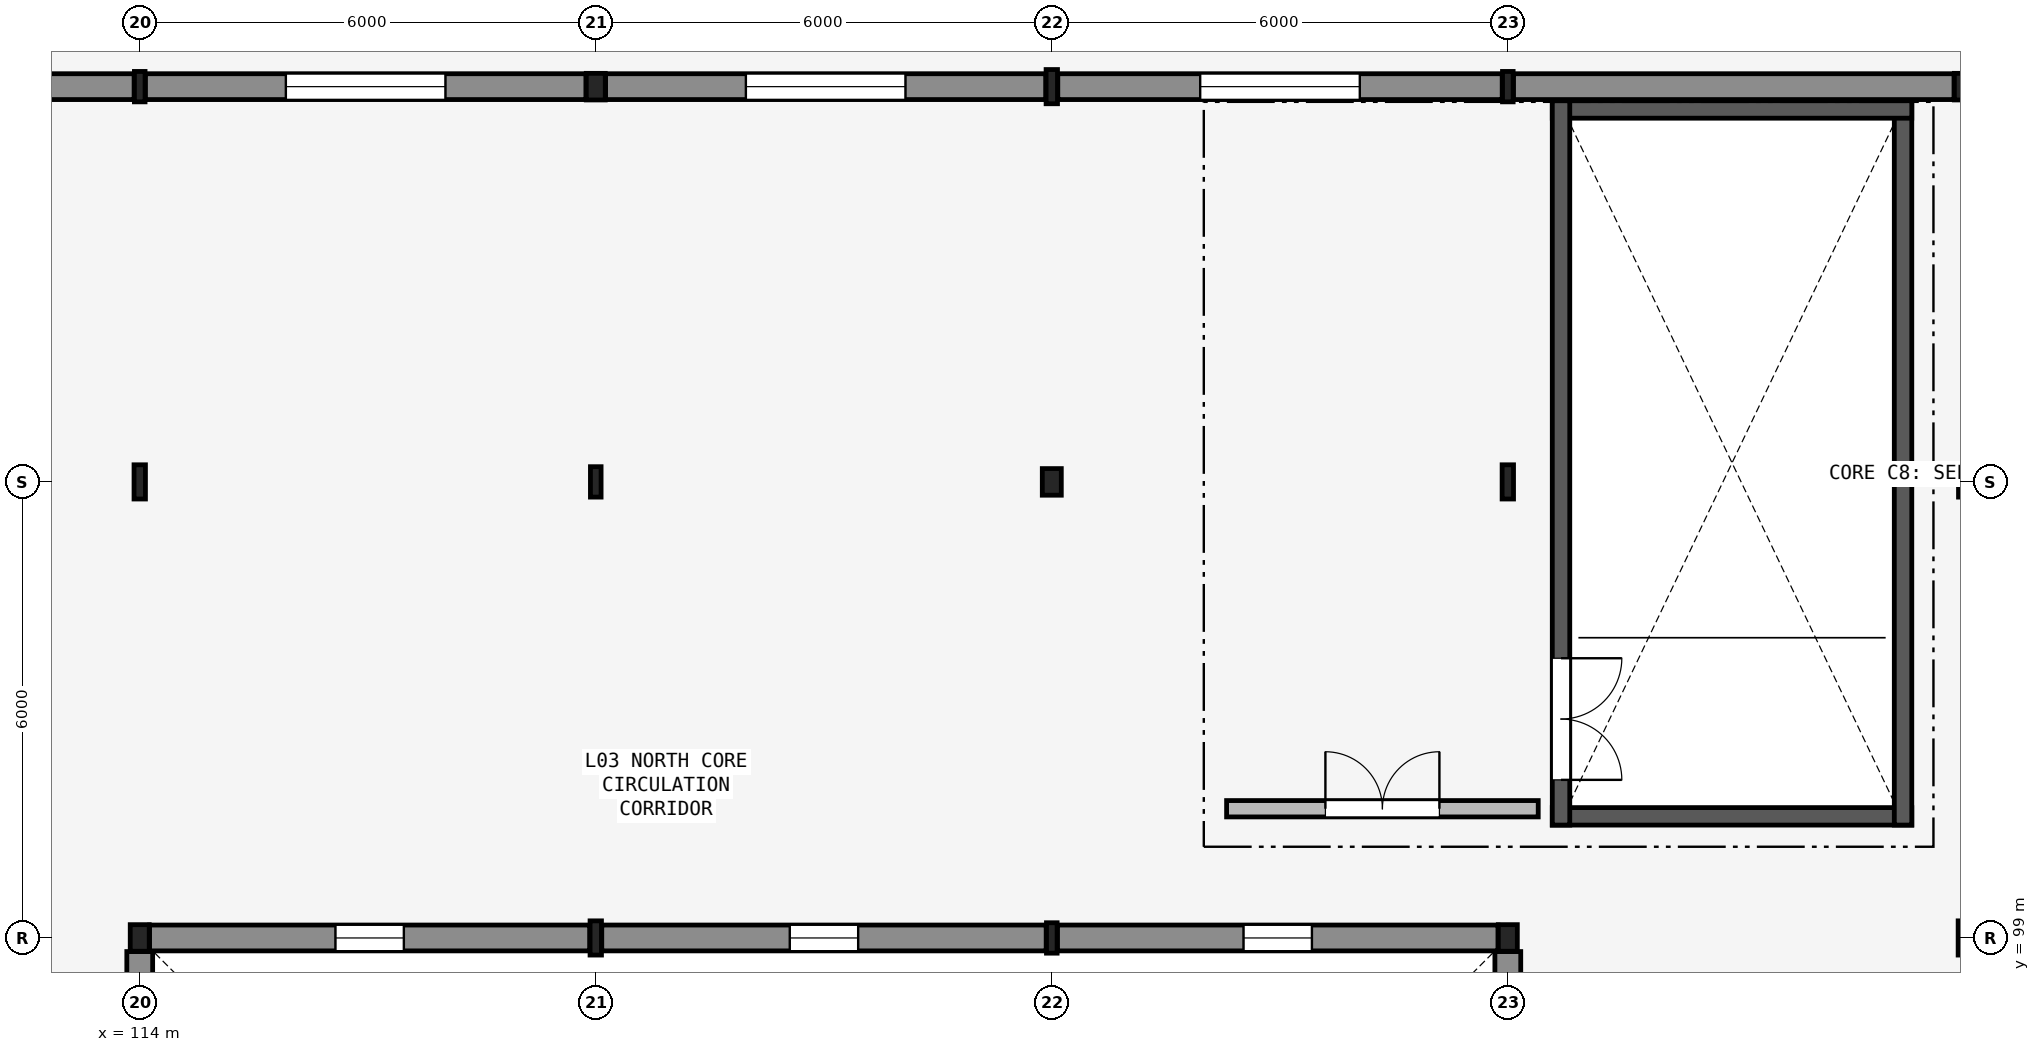
"""IFC4 building model, lengths in metres.
Left out: names, types, materials, properties, quantities, classifications, styles, units other than length and angle.
Written with IfcOpenShell. Run it as: python <this file> out.ifc"""

import sys

from ifc_helpers import new_model, si_unit, direction, frame, frame_2d, origin, origin_2d, place, context, subcontext, project, spatial, rectangle, i_section, extrude, element, fill, save


model = new_model("IFC4")
c1 = context("Model", 3, precision=1e-05, world=origin(), true_north=direction((0.0, 1.0)))
c2 = subcontext(c1, "Body", "Model", "MODEL_VIEW")
j1 = project(units=[si_unit("LENGTHUNIT", "METRE"), si_unit("PLANEANGLEUNIT", "RADIAN")], contexts=[c1])
p1 = place(None, origin())
s1 = spatial("IfcSite", under=j1, at=p1, CompositionType="ELEMENT")
p2 = place(p1, origin())
s2 = spatial("IfcBuilding", under=s1, at=p2, CompositionType="ELEMENT")
p3 = place(p2, frame((0.0, 0.0, 13.5)))
s3 = spatial("IfcBuildingStorey", under=s2, at=p3, CompositionType="ELEMENT", Elevation=13.5)
p4 = place(p3, frame((114.0, 99.0, 0.0), z_axis=(0.0, 0.0, 1.0), x_axis=(1.0, 0.0, 0.0)))
e1 = element("IfcColumn", 1, at=p4, inside=s3, PredefinedType="COLUMN", context=c2, shape_type="SweptSolid", body=[
    extrude(i_section(OverallWidth=0.25, OverallDepth=0.35, WebThickness=0.01, FlangeThickness=0.012, FilletRadius=0.012, at=origin_2d()), origin(), (0.0, 0.0, 1.0), 4.5),
])
p5 = place(p3, frame((114.0, 105.0, 0.0), z_axis=(0.0, 0.0, 1.0), x_axis=(1.0, 0.0, 0.0)))
e2 = element("IfcColumn", 2, at=p5, inside=s3, PredefinedType="COLUMN", context=c2, shape_type="SweptSolid", body=[
    extrude(i_section(OverallWidth=0.15, OverallDepth=0.45, WebThickness=0.01, FlangeThickness=0.017, FilletRadius=0.015, at=origin_2d()), origin(), (0.0, 0.0, 1.0), 4.5),
])
p6 = place(p3, frame((114.0, 110.2, 0.0), z_axis=(0.0, 0.0, 1.0), x_axis=(1.0, 0.0, 0.0)))
e3 = element("IfcColumn", 3, at=p6, inside=s3, PredefinedType="COLUMN", context=c2, shape_type="SweptSolid", body=[
    extrude(i_section(OverallWidth=0.14, OverallDepth=0.4, WebThickness=0.009, FlangeThickness=0.016, FilletRadius=0.014, at=origin_2d()), origin(), (0.0, 0.0, 1.0), 4.5),
])
p7 = place(p3, frame((120.0, 99.0, 0.0), z_axis=(0.0, 0.0, 1.0), x_axis=(1.0, 0.0, 0.0)))
e4 = element("IfcColumn", 4, at=p7, inside=s3, PredefinedType="COLUMN", context=c2, shape_type="SweptSolid", body=[
    extrude(i_section(OverallWidth=0.15, OverallDepth=0.45, WebThickness=0.01, FlangeThickness=0.017, FilletRadius=0.015, at=origin_2d()), origin(), (0.0, 0.0, 1.0), 4.5),
])
p8 = place(p3, frame((120.0, 105.0, 0.0), z_axis=(0.0, 0.0, 1.0), x_axis=(1.0, 0.0, 0.0)))
e5 = element("IfcColumn", 5, at=p8, inside=s3, PredefinedType="COLUMN", context=c2, shape_type="SweptSolid", body=[
    extrude(i_section(OverallWidth=0.14, OverallDepth=0.4, WebThickness=0.009, FlangeThickness=0.016, FilletRadius=0.014, at=origin_2d()), origin(), (0.0, 0.0, 1.0), 4.5),
])
p9 = place(p3, frame((120.0, 110.2, 0.0), z_axis=(0.0, 0.0, 1.0), x_axis=(1.0, 0.0, 0.0)))
e6 = element("IfcColumn", 6, at=p9, inside=s3, PredefinedType="COLUMN", context=c2, shape_type="SweptSolid", body=[
    extrude(i_section(OverallWidth=0.25, OverallDepth=0.35, WebThickness=0.01, FlangeThickness=0.012, FilletRadius=0.012, at=origin_2d()), origin(), (0.0, 0.0, 1.0), 4.5),
])
p10 = place(p3, frame((126.0, 99.0, 0.0), z_axis=(0.0, 0.0, 1.0), x_axis=(1.0, 0.0, 0.0)))
e7 = element("IfcColumn", 7, at=p10, inside=s3, PredefinedType="COLUMN", context=c2, shape_type="SweptSolid", body=[
    extrude(i_section(OverallWidth=0.14, OverallDepth=0.4, WebThickness=0.009, FlangeThickness=0.016, FilletRadius=0.014, at=origin_2d()), origin(), (0.0, 0.0, 1.0), 4.5),
])
p11 = place(p3, frame((126.0, 105.0, 0.0), z_axis=(0.0, 0.0, 1.0), x_axis=(1.0, 0.0, 0.0)))
e8 = element("IfcColumn", 8, at=p11, inside=s3, PredefinedType="COLUMN", context=c2, shape_type="SweptSolid", body=[
    extrude(i_section(OverallWidth=0.25, OverallDepth=0.35, WebThickness=0.01, FlangeThickness=0.012, FilletRadius=0.012, at=origin_2d()), origin(), (0.0, 0.0, 1.0), 4.5),
])
p12 = place(p3, frame((126.0, 110.2, 0.0), z_axis=(0.0, 0.0, 1.0), x_axis=(1.0, 0.0, 0.0)))
e9 = element("IfcColumn", 9, at=p12, inside=s3, PredefinedType="COLUMN", context=c2, shape_type="SweptSolid", body=[
    extrude(i_section(OverallWidth=0.15, OverallDepth=0.45, WebThickness=0.01, FlangeThickness=0.017, FilletRadius=0.015, at=origin_2d()), origin(), (0.0, 0.0, 1.0), 4.5),
])
p13 = place(p3, frame((132.0, 99.0, 0.0), z_axis=(0.0, 0.0, 1.0), x_axis=(1.0, 0.0, 0.0)))
e10 = element("IfcColumn", 10, at=p13, inside=s3, PredefinedType="COLUMN", context=c2, shape_type="SweptSolid", body=[
    extrude(i_section(OverallWidth=0.25, OverallDepth=0.35, WebThickness=0.01, FlangeThickness=0.012, FilletRadius=0.012, at=origin_2d()), origin(), (0.0, 0.0, 1.0), 4.5),
])
p14 = place(p3, frame((132.0, 105.0, 0.0), z_axis=(0.0, 0.0, 1.0), x_axis=(1.0, 0.0, 0.0)))
e11 = element("IfcColumn", 11, at=p14, inside=s3, PredefinedType="COLUMN", context=c2, shape_type="SweptSolid", body=[
    extrude(i_section(OverallWidth=0.15, OverallDepth=0.45, WebThickness=0.01, FlangeThickness=0.017, FilletRadius=0.015, at=origin_2d()), origin(), (0.0, 0.0, 1.0), 4.5),
])
p15 = place(p3, frame((132.0, 110.2, 0.0), z_axis=(0.0, 0.0, 1.0), x_axis=(1.0, 0.0, 0.0)))
e12 = element("IfcColumn", 12, at=p15, inside=s3, PredefinedType="COLUMN", context=c2, shape_type="SweptSolid", body=[
    extrude(i_section(OverallWidth=0.14, OverallDepth=0.4, WebThickness=0.009, FlangeThickness=0.016, FilletRadius=0.014, at=origin_2d()), origin(), (0.0, 0.0, 1.0), 4.5),
])
p16 = place(p3, frame((138.0, 99.0, 0.0), z_axis=(0.0, 0.0, 1.0), x_axis=(1.0, 0.0, 0.0)))
e13 = element("IfcColumn", 13, at=p16, inside=s3, PredefinedType="COLUMN", context=c2, shape_type="SweptSolid", body=[
    extrude(i_section(OverallWidth=0.15, OverallDepth=0.45, WebThickness=0.01, FlangeThickness=0.017, FilletRadius=0.015, at=origin_2d()), origin(), (0.0, 0.0, 1.0), 4.5),
])
p17 = place(p3, frame((138.0, 105.0, 0.0), z_axis=(0.0, 0.0, 1.0), x_axis=(1.0, 0.0, 0.0)))
e14 = element("IfcColumn", 14, at=p17, inside=s3, PredefinedType="COLUMN", context=c2, shape_type="SweptSolid", body=[
    extrude(i_section(OverallWidth=0.14, OverallDepth=0.4, WebThickness=0.009, FlangeThickness=0.016, FilletRadius=0.014, at=origin_2d()), origin(), (0.0, 0.0, 1.0), 4.5),
])
p18 = place(p3, frame((138.0, 110.2, 0.0), z_axis=(0.0, 0.0, 1.0), x_axis=(1.0, 0.0, 0.0)))
e15 = element("IfcColumn", 15, at=p18, inside=s3, PredefinedType="COLUMN", context=c2, shape_type="SweptSolid", body=[
    extrude(i_section(OverallWidth=0.25, OverallDepth=0.35, WebThickness=0.01, FlangeThickness=0.012, FilletRadius=0.012, at=origin_2d()), origin(), (0.0, 0.0, 1.0), 4.5),
])
p19 = place(p3, frame((108.079, 110.2, 0.0), z_axis=(0.0, 0.0, 1.0), x_axis=(1.0, 0.0, 0.0)))
e16 = element("IfcWall", 16, at=p19, inside=s3, PredefinedType="SOLIDWALL", context=c2, shape_type="SweptSolid", body=[
    extrude(rectangle(XDim=5.847, YDim=0.34, at=frame_2d((2.923, 0.0))), origin(), (0.0, 0.0, 1.0), 3.74),
])
p20 = place(p19, frame((1.874, 0.0, 0.9)))
e17 = element("IfcOpeningElement", 17, at=p20, cuts=e16, PredefinedType="OPENING", context=c2, shape_type="SweptSolid", body=[
    extrude(rectangle(XDim=2.1, YDim=1.5, at=frame_2d((1.05, 0.75))), frame((0.0, 0.18, 0.0), z_axis=(0.0, -1.0, 0.0), x_axis=(1.0, 0.0, 0.0)), (0.0, 0.0, 1.0), 0.36),
])
p21 = place(p3, frame((114.074, 110.2, 0.0), z_axis=(0.0, 0.0, 1.0), x_axis=(1.0, 0.0, 0.0)))
e18 = element("IfcWall", 18, at=p21, inside=s3, PredefinedType="SOLIDWALL", context=c2, shape_type="SweptSolid", body=[
    extrude(rectangle(XDim=5.797, YDim=0.34, at=frame_2d((2.898, 0.0))), origin(), (0.0, 0.0, 1.0), 3.74),
])
p22 = place(p21, frame((1.848, 0.0, 0.9)))
e19 = element("IfcOpeningElement", 19, at=p22, cuts=e18, PredefinedType="OPENING", context=c2, shape_type="SweptSolid", body=[
    extrude(rectangle(XDim=2.1, YDim=1.5, at=frame_2d((1.05, 0.75))), frame((0.0, 0.18, 0.0), z_axis=(0.0, -1.0, 0.0), x_axis=(1.0, 0.0, 0.0)), (0.0, 0.0, 1.0), 0.36),
])
p23 = place(p3, frame((120.129, 110.2, 0.0), z_axis=(0.0, 0.0, 1.0), x_axis=(1.0, 0.0, 0.0)))
e20 = element("IfcWall", 20, at=p23, inside=s3, PredefinedType="SOLIDWALL", context=c2, shape_type="SweptSolid", body=[
    extrude(rectangle(XDim=5.792, YDim=0.34, at=frame_2d((2.896, 0.0))), origin(), (0.0, 0.0, 1.0), 3.74),
])
p24 = place(p23, frame((1.846, 0.0, 0.9)))
e21 = element("IfcOpeningElement", 21, at=p24, cuts=e20, PredefinedType="OPENING", context=c2, shape_type="SweptSolid", body=[
    extrude(rectangle(XDim=2.1, YDim=1.5, at=frame_2d((1.05, 0.75))), frame((0.0, 0.18, 0.0), z_axis=(0.0, -1.0, 0.0), x_axis=(1.0, 0.0, 0.0)), (0.0, 0.0, 1.0), 0.36),
])
p25 = place(p3, frame((126.079, 110.2, 0.0), z_axis=(0.0, 0.0, 1.0), x_axis=(1.0, 0.0, 0.0)))
e22 = element("IfcWall", 22, at=p25, inside=s3, PredefinedType="SOLIDWALL", context=c2, shape_type="SweptSolid", body=[
    extrude(rectangle(XDim=5.847, YDim=0.34, at=frame_2d((2.923, 0.0))), origin(), (0.0, 0.0, 1.0), 3.74),
])
p26 = place(p25, frame((1.874, 0.0, 0.9)))
e23 = element("IfcOpeningElement", 23, at=p26, cuts=e22, PredefinedType="OPENING", context=c2, shape_type="SweptSolid", body=[
    extrude(rectangle(XDim=2.1, YDim=1.5, at=frame_2d((1.05, 0.75))), frame((0.0, 0.18, 0.0), z_axis=(0.0, -1.0, 0.0), x_axis=(1.0, 0.0, 0.0)), (0.0, 0.0, 1.0), 0.36),
])
p27 = place(p3, frame((132.074, 110.2, 0.0), z_axis=(0.0, 0.0, 1.0), x_axis=(1.0, 0.0, 0.0)))
e24 = element("IfcWall", 24, at=p27, inside=s3, PredefinedType="SOLIDWALL", context=c2, shape_type="SweptSolid", body=[
    extrude(rectangle(XDim=5.797, YDim=0.34, at=frame_2d((2.898, 0.0))), origin(), (0.0, 0.0, 1.0), 3.74),
])
p28 = place(p3, frame((114.129, 99.0, 0.0), z_axis=(0.0, 0.0, 1.0), x_axis=(1.0, 0.0, 0.0)))
e25 = element("IfcWall", 25, at=p28, inside=s3, PredefinedType="SOLIDWALL", context=c2, shape_type="SweptSolid", body=[
    extrude(rectangle(XDim=5.792, YDim=0.34, at=frame_2d((2.896, 0.0))), origin(), (0.0, 0.0, 1.0), 3.69),
])
p29 = place(p28, frame((2.446, 0.0, 1.6)))
e26 = element("IfcOpeningElement", 26, at=p29, cuts=e25, PredefinedType="OPENING", context=c2, shape_type="SweptSolid", body=[
    extrude(rectangle(XDim=0.9, YDim=0.6, at=frame_2d((0.45, 0.3))), frame((0.0, 0.18, 0.0), z_axis=(0.0, -1.0, 0.0), x_axis=(1.0, 0.0, 0.0)), (0.0, 0.0, 1.0), 0.36),
])
p30 = place(p3, frame((120.079, 99.0, 0.0), z_axis=(0.0, 0.0, 1.0), x_axis=(1.0, 0.0, 0.0)))
e27 = element("IfcWall", 27, at=p30, inside=s3, PredefinedType="SOLIDWALL", context=c2, shape_type="SweptSolid", body=[
    extrude(rectangle(XDim=5.847, YDim=0.34, at=frame_2d((2.923, 0.0))), origin(), (0.0, 0.0, 1.0), 3.69),
])
p31 = place(p30, frame((2.473, 0.0, 1.6)))
e28 = element("IfcOpeningElement", 28, at=p31, cuts=e27, PredefinedType="OPENING", context=c2, shape_type="SweptSolid", body=[
    extrude(rectangle(XDim=0.9, YDim=0.6, at=frame_2d((0.45, 0.3))), frame((0.0, 0.18, 0.0), z_axis=(0.0, -1.0, 0.0), x_axis=(1.0, 0.0, 0.0)), (0.0, 0.0, 1.0), 0.36),
])
p32 = place(p3, frame((126.074, 99.0, 0.0), z_axis=(0.0, 0.0, 1.0), x_axis=(1.0, 0.0, 0.0)))
e29 = element("IfcWall", 29, at=p32, inside=s3, PredefinedType="SOLIDWALL", context=c2, shape_type="SweptSolid", body=[
    extrude(rectangle(XDim=5.797, YDim=0.34, at=frame_2d((2.898, 0.0))), origin(), (0.0, 0.0, 1.0), 3.69),
])
p33 = place(p32, frame((2.448, 0.0, 1.6)))
e30 = element("IfcOpeningElement", 30, at=p33, cuts=e29, PredefinedType="OPENING", context=c2, shape_type="SweptSolid", body=[
    extrude(rectangle(XDim=0.9, YDim=0.6, at=frame_2d((0.45, 0.3))), frame((0.0, 0.18, 0.0), z_axis=(0.0, -1.0, 0.0), x_axis=(1.0, 0.0, 0.0)), (0.0, 0.0, 1.0), 0.36),
])
p34 = place(p3, frame((114.0, 93.204, 0.0), z_axis=(0.0, 0.0, 1.0), x_axis=(0.0, 1.0, 0.0)))
e31 = element("IfcWall", 31, at=p34, inside=s3, PredefinedType="SOLIDWALL", context=c2, shape_type="SweptSolid", body=[
    extrude(rectangle(XDim=5.617, YDim=0.34, at=frame_2d((2.809, 0.0))), origin(), (0.0, 0.0, 1.0), 3.69),
])
p35 = place(p34, frame((2.358, 0.0, 1.6)))
e32 = element("IfcOpeningElement", 32, at=p35, cuts=e31, PredefinedType="OPENING", context=c2, shape_type="SweptSolid", body=[
    extrude(rectangle(XDim=0.9, YDim=0.6, at=frame_2d((0.45, 0.3))), frame((0.0, 0.18, 0.0), z_axis=(0.0, -1.0, 0.0), x_axis=(1.0, 0.0, 0.0)), (0.0, 0.0, 1.0), 0.36),
])
p36 = place(p3, frame((132.0, 93.204, 0.0), z_axis=(0.0, 0.0, 1.0), x_axis=(0.0, 1.0, 0.0)))
e33 = element("IfcWall", 33, at=p36, inside=s3, PredefinedType="SOLIDWALL", context=c2, shape_type="SweptSolid", body=[
    extrude(rectangle(XDim=5.617, YDim=0.34, at=frame_2d((2.809, 0.0))), origin(), (0.0, 0.0, 1.0), 3.59),
])
p37 = place(p36, frame((2.358, 0.0, 1.6)))
e34 = element("IfcOpeningElement", 34, at=p37, cuts=e33, PredefinedType="OPENING", context=c2, shape_type="SweptSolid", body=[
    extrude(rectangle(XDim=0.9, YDim=0.6, at=frame_2d((0.45, 0.3))), frame((0.0, 0.18, 0.0), z_axis=(0.0, -1.0, 0.0), x_axis=(1.0, 0.0, 0.0)), (0.0, 0.0, 1.0), 0.36),
])
p38 = place(p3, frame((132.585, 100.6, 0.0), z_axis=(0.0, 0.0, 1.0), x_axis=(1.0, 0.0, 0.0)))
e35 = element("IfcWall", 35, at=p38, inside=s3, PredefinedType="SHEAR", context=c2, shape_type="SweptSolid", body=[
    extrude(rectangle(XDim=4.73, YDim=0.23, at=frame_2d((2.365, 0.0))), origin(), (0.0, 0.0, 1.0), 4.36),
])
p39 = place(p3, frame((137.2, 100.485, 0.0), z_axis=(0.0, 0.0, 1.0), x_axis=(0.0, 1.0, 0.0)))
e36 = element("IfcWall", 36, at=p39, inside=s3, PredefinedType="SHEAR", context=c2, shape_type="SweptSolid", body=[
    extrude(rectangle(XDim=9.53, YDim=0.23, at=frame_2d((4.765, 0.0))), origin(), (0.0, 0.0, 1.0), 4.36),
])
p40 = place(p3, frame((137.315, 109.9, 0.0), z_axis=(0.0, 0.0, 1.0), x_axis=(-1.0, 0.0, 0.0)))
e37 = element("IfcWall", 37, at=p40, inside=s3, PredefinedType="SHEAR", context=c2, shape_type="SweptSolid", body=[
    extrude(rectangle(XDim=4.73, YDim=0.23, at=frame_2d((2.365, 0.0))), origin(), (0.0, 0.0, 1.0), 4.36),
])
p41 = place(p3, frame((132.7, 110.015, 0.0), z_axis=(0.0, 0.0, 1.0), x_axis=(0.0, -1.0, 0.0)))
e38 = element("IfcWall", 38, at=p41, inside=s3, PredefinedType="SHEAR", context=c2, shape_type="SweptSolid", body=[
    extrude(rectangle(XDim=9.53, YDim=0.23, at=frame_2d((4.765, 0.0))), origin(), (0.0, 0.0, 1.0), 4.36),
])
p42 = place(p41, frame((7.335, 0.0, 0.0)))
e39 = element("IfcOpeningElement", 39, at=p42, cuts=e38, PredefinedType="OPENING", context=c2, shape_type="SweptSolid", body=[
    extrude(rectangle(XDim=1.6, YDim=2.2, at=frame_2d((0.8, 1.1))), frame((0.0, 0.125, 0.0), z_axis=(0.0, -1.0, 0.0), x_axis=(1.0, 0.0, 0.0)), (0.0, 0.0, 1.0), 0.25),
])
p43 = place(p3, frame((128.3, 100.7, 0.0), z_axis=(0.0, 0.0, 1.0), x_axis=(1.0, 0.0, 0.0)))
e40 = element("IfcWall", 40, at=p43, inside=s3, PredefinedType="PARTITIONING", context=c2, shape_type="SweptSolid", body=[
    extrude(rectangle(XDim=4.1, YDim=0.215, at=frame_2d((2.05, 0.0))), origin(), (0.0, 0.0, 1.0), 3.69),
])
p44 = place(p43, frame((1.3, 0.0, 0.0)))
e41 = element("IfcOpeningElement", 41, at=p44, cuts=e40, PredefinedType="OPENING", context=c2, shape_type="SweptSolid", body=[
    extrude(rectangle(XDim=1.5, YDim=2.15, at=frame_2d((0.75, 1.075))), frame((0.0, 0.117, 0.0), z_axis=(0.0, -1.0, 0.0), x_axis=(1.0, 0.0, 0.0)), (0.0, 0.0, 1.0), 0.235),
])
p45 = place(p22, origin())
e42 = element("IfcWindow", 42, at=p45, inside=s3, PartitioningType="SINGLE_PANEL", PredefinedType="WINDOW", context=c2, shape_type="SweptSolid", body=[
    extrude(rectangle(XDim=2.1, YDim=1.5, at=frame_2d((1.05, 0.75))), frame((0.0, 0.03, 0.0), z_axis=(0.0, -1.0, 0.0), x_axis=(1.0, 0.0, 0.0)), (0.0, 0.0, 1.0), 0.06),
])
fill(e19, e42)
p46 = place(p24, origin())
e43 = element("IfcWindow", 43, at=p46, inside=s3, PartitioningType="SINGLE_PANEL", PredefinedType="WINDOW", context=c2, shape_type="SweptSolid", body=[
    extrude(rectangle(XDim=2.1, YDim=1.5, at=frame_2d((1.05, 0.75))), frame((0.0, 0.03, 0.0), z_axis=(0.0, -1.0, 0.0), x_axis=(1.0, 0.0, 0.0)), (0.0, 0.0, 1.0), 0.06),
])
fill(e21, e43)
p47 = place(p26, origin())
e44 = element("IfcWindow", 44, at=p47, inside=s3, PartitioningType="SINGLE_PANEL", PredefinedType="WINDOW", context=c2, shape_type="SweptSolid", body=[
    extrude(rectangle(XDim=2.1, YDim=1.5, at=frame_2d((1.05, 0.75))), frame((0.0, 0.03, 0.0), z_axis=(0.0, -1.0, 0.0), x_axis=(1.0, 0.0, 0.0)), (0.0, 0.0, 1.0), 0.06),
])
fill(e23, e44)
p48 = place(p29, origin())
e45 = element("IfcWindow", 45, at=p48, inside=s3, PartitioningType="SINGLE_PANEL", PredefinedType="WINDOW", context=c2, shape_type="SweptSolid", body=[
    extrude(rectangle(XDim=0.9, YDim=0.6, at=frame_2d((0.45, 0.3))), frame((0.0, 0.03, 0.0), z_axis=(0.0, -1.0, 0.0), x_axis=(1.0, 0.0, 0.0)), (0.0, 0.0, 1.0), 0.06),
])
fill(e26, e45)
p49 = place(p31, origin())
e46 = element("IfcWindow", 46, at=p49, inside=s3, PartitioningType="SINGLE_PANEL", PredefinedType="WINDOW", context=c2, shape_type="SweptSolid", body=[
    extrude(rectangle(XDim=0.9, YDim=0.6, at=frame_2d((0.45, 0.3))), frame((0.0, 0.03, 0.0), z_axis=(0.0, -1.0, 0.0), x_axis=(1.0, 0.0, 0.0)), (0.0, 0.0, 1.0), 0.06),
])
fill(e28, e46)
p50 = place(p33, origin())
e47 = element("IfcWindow", 47, at=p50, inside=s3, PartitioningType="SINGLE_PANEL", PredefinedType="WINDOW", context=c2, shape_type="SweptSolid", body=[
    extrude(rectangle(XDim=0.9, YDim=0.6, at=frame_2d((0.45, 0.3))), frame((0.0, 0.03, 0.0), z_axis=(0.0, -1.0, 0.0), x_axis=(1.0, 0.0, 0.0)), (0.0, 0.0, 1.0), 0.06),
])
fill(e30, e47)
p51 = place(p42, origin())
e48 = element("IfcDoor", 48, at=p51, inside=s3, OperationType="DOUBLE_DOOR_SINGLE_SWING", PredefinedType="DOOR", context=c2, shape_type="SweptSolid", body=[
    extrude(rectangle(XDim=1.6, YDim=2.2, at=frame_2d((0.8, 1.1))), frame((0.0, 0.025, 0.0), z_axis=(0.0, -1.0, 0.0), x_axis=(1.0, 0.0, 0.0)), (0.0, 0.0, 1.0), 0.05),
])
fill(e39, e48)
p52 = place(p44, origin())
e49 = element("IfcDoor", 49, at=p52, inside=s3, OperationType="DOUBLE_DOOR_SINGLE_SWING", PredefinedType="DOOR", context=c2, shape_type="SweptSolid", body=[
    extrude(rectangle(XDim=1.5, YDim=2.15, at=frame_2d((0.75, 1.075))), frame((0.0, 0.025, 0.0), z_axis=(0.0, -1.0, 0.0), x_axis=(1.0, 0.0, 0.0)), (0.0, 0.0, 1.0), 0.05),
])
fill(e41, e49)
save(model, sys.argv[1])
